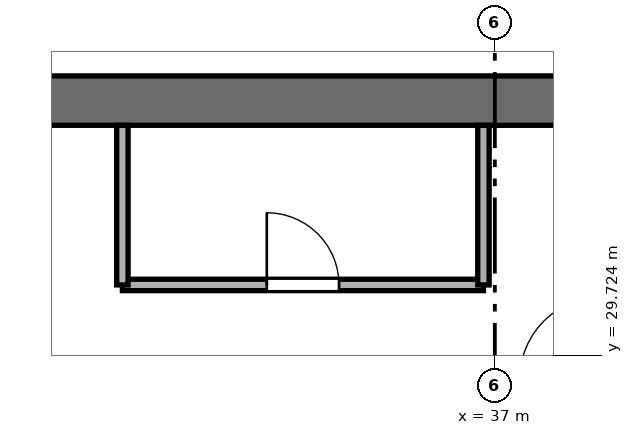
"""IFC4 building model, lengths in metres.
Left out: names, types, materials, properties, quantities, classifications, styles, units other than length and angle.
Written with IfcOpenShell. Run it as: python <this file> out.ifc"""

import sys

from ifc_helpers import new_model, si_unit, direction, frame, frame_2d, origin, place, context, subcontext, project, spatial, rectangle, extrude, element, fill, save


model = new_model("IFC4")
c1 = context("Model", 3, precision=1e-05, world=origin(), true_north=direction((0.0, 1.0)))
c2 = subcontext(c1, "Body", "Model", "MODEL_VIEW")
j1 = project(units=[si_unit("LENGTHUNIT", "METRE"), si_unit("PLANEANGLEUNIT", "RADIAN")], contexts=[c1])
p1 = place(None, origin())
s1 = spatial("IfcSite", under=j1, at=p1, CompositionType="ELEMENT")
p2 = place(p1, origin())
s2 = spatial("IfcBuilding", under=s1, at=p2, CompositionType="ELEMENT")
p3 = place(p2, origin())
s3 = spatial("IfcBuildingStorey", under=s2, at=p3, CompositionType="ELEMENT", Elevation=0.0)
p4 = place(p3, frame((25.4, 33.075, 0.0), z_axis=(0.0, 0.0, 1.0), x_axis=(1.0, 0.0, 0.0)))
e1 = element("IfcWall", 1, at=p4, inside=s3, PredefinedType="SHEAR", context=c2, shape_type="SweptSolid", body=[
    extrude(rectangle(XDim=23.2, YDim=0.65, at=frame_2d((11.6, 0.0))), origin(), (0.0, 0.0, 1.0), 4.66),
])
p5 = place(p3, frame((32.1, 30.65, 0.0), z_axis=(0.0, 0.0, 1.0), x_axis=(1.0, 0.0, 0.0)))
e2 = element("IfcWall", 2, at=p5, inside=s3, PredefinedType="PARTITIONING", context=c2, shape_type="SweptSolid", body=[
    extrude(rectangle(XDim=4.75, YDim=0.15, at=frame_2d((2.375, 0.0))), origin(), (0.0, 0.0, 1.0), 4.66),
])
p6 = place(p5, frame((1.9, 0.0, 0.0)))
e3 = element("IfcOpeningElement", 3, at=p6, cuts=e2, PredefinedType="OPENING", context=c2, shape_type="SweptSolid", body=[
    extrude(rectangle(XDim=0.95, YDim=2.1, at=frame_2d((0.475, 1.05))), frame((0.0, 0.085, 0.0), z_axis=(0.0, -1.0, 0.0), x_axis=(1.0, 0.0, 0.0)), (0.0, 0.0, 1.0), 0.17),
])
for number, where, z_axis, x_axis in (
    (4, (32.1, 30.65, 0.0), (0.0, 0.0, 1.0), (0.0, 1.0, 0.0)),
    (5, (36.85, 30.65, 0.0), (0.0, 0.0, 1.0), (0.0, 1.0, 0.0)),
):
    element("IfcWall", number, at=place(p3, frame(where, z_axis=z_axis, x_axis=x_axis)), inside=s3, PredefinedType="PARTITIONING", context=c2, shape_type="SweptSolid", body=[
        extrude(rectangle(XDim=2.1, YDim=0.15, at=frame_2d((1.05, 0.0))), origin(), (0.0, 0.0, 1.0), 4.66),
    ])
p7 = place(p6, origin())
e6 = element("IfcDoor", 6, at=p7, inside=s3, OperationType="SINGLE_SWING_LEFT", PredefinedType="DOOR", context=c2, shape_type="SweptSolid", body=[
    extrude(rectangle(XDim=0.95, YDim=2.1, at=frame_2d((0.475, 1.05))), frame((0.0, 0.025, 0.0), z_axis=(0.0, -1.0, 0.0), x_axis=(1.0, 0.0, 0.0)), (0.0, 0.0, 1.0), 0.05),
])
fill(e3, e6)
save(model, sys.argv[1])
